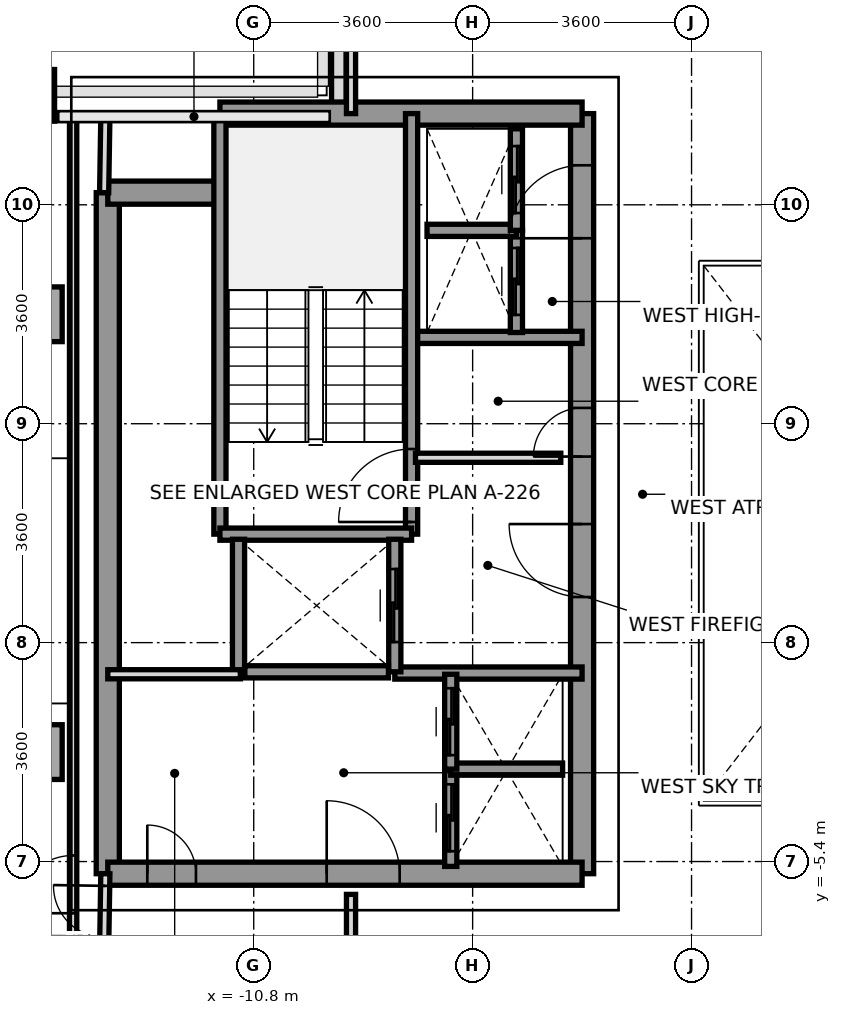
"""IFC4 building model, lengths in metres.
Left out: names, types, materials, properties, quantities, classifications, styles, units other than length and angle.
Written with IfcOpenShell. Run it as: python <this file> out.ifc"""

import sys

from ifc_helpers import new_model, si_unit, direction, frame, frame_2d, origin, origin_2d, place, context, subcontext, project, spatial, rectangle, extrude, source, transform, mapped, element, fill, save


model = new_model("IFC4")
c1 = context("Model", 3, precision=1e-05, world=origin(), true_north=direction((0.0, 1.0)))
c2 = subcontext(c1, "Body", "Model", "MODEL_VIEW")
j1 = project(units=[si_unit("LENGTHUNIT", "METRE"), si_unit("PLANEANGLEUNIT", "RADIAN")], contexts=[c1])
p1 = place(None, origin())
s1 = spatial("IfcSite", under=j1, at=p1, CompositionType="ELEMENT")
p2 = place(p1, origin())
s2 = spatial("IfcBuilding", under=s1, at=p2, CompositionType="ELEMENT")
p3 = place(p2, frame((0.0, 0.0, 177.4)))
s3 = spatial("IfcBuildingStorey", under=s2, at=p3, CompositionType="ELEMENT", Elevation=177.4)
m1 = source(origin(), c2, "Body", "SweptSolid", [
    extrude(rectangle(XDim=0.9, YDim=0.9, at=origin_2d()), origin(), (0.0, 0.0, 1.0), 3.2),
])
for number, where, z_axis, x_axis in (
    (1, (-14.4, -3.6, 0.0), (0.0, 0.0, 1.0), (1.0, 0.0, 0.0)),
    (2, (-14.4, 3.6, 0.0), (0.0, 0.0, 1.0), (1.0, 0.0, 0.0)),
):
    element("IfcColumn", number, at=place(p3, frame(where, z_axis=z_axis, x_axis=x_axis)), inside=s3, PredefinedType="COLUMN", context=c2, shape_type="MappedRepresentation", body=[
        mapped(m1, transform((0.0, 0.0, 0.0), x_axis=(1.0, 0.0, 0.0), y_axis=(0.0, 1.0, 0.0), z_axis=(0.0, 0.0, 1.0), scale=1.0)),
    ])
m2 = source(origin(), c2, "Body", "SweptSolid", [
    extrude(rectangle(XDim=0.65, YDim=0.85, at=origin_2d()), origin(), (0.0, 0.0, 1.0), 3.2),
])
p4 = place(p3, frame((-14.4, 7.2, 0.0), z_axis=(0.0, 0.0, 1.0), x_axis=(1.0, 0.0, 0.0)))
e3 = element("IfcColumn", 3, at=p4, inside=s3, PredefinedType="COLUMN", context=c2, shape_type="MappedRepresentation", body=[
    mapped(m2, transform((0.0, 0.0, 0.0), x_axis=(1.0, 0.0, 0.0), y_axis=(0.0, 1.0, 0.0), z_axis=(0.0, 0.0, 1.0), scale=1.0)),
])
p5 = place(p3, frame((-9.4, 6.953, 0.0), z_axis=(0.0, 0.0, 1.0), x_axis=(0.0, 1.0, 0.0)))
e4 = element("IfcWall", 4, at=p5, inside=s3, PredefinedType="PARAPET", context=c2, shape_type="SweptSolid", body=[
    extrude(rectangle(XDim=1.594, YDim=0.24, at=frame_2d((0.797, 0.0))), origin(), (0.0, 0.0, 1.0), 1.15),
])
p6 = place(p3, frame((-13.2, -5.6, 0.0), z_axis=(0.0, 0.0, 1.0), x_axis=(0.0, 1.0, 0.0)))
e5 = element("IfcWall", 5, at=p6, inside=s3, PredefinedType="SHEAR", context=c2, shape_type="SweptSolid", body=[
    extrude(rectangle(XDim=11.2, YDim=0.38, at=frame_2d((5.6, 0.0))), origin(), (0.0, 0.0, 1.0), 3.2),
])
p7 = place(p3, frame((-5.4, -5.6, 0.0), z_axis=(0.0, 0.0, 1.0), x_axis=(0.0, 1.0, 0.0)))
e6 = element("IfcWall", 6, at=p7, inside=s3, PredefinedType="SHEAR", context=c2, shape_type="SweptSolid", body=[
    extrude(rectangle(XDim=12.5, YDim=0.38, at=frame_2d((6.25, 0.0))), origin(), (0.0, 0.0, 1.0), 3.2),
])
p8 = place(p7, frame((4.55, 0.0, 0.0)))
e7 = element("IfcOpeningElement", 7, at=p8, cuts=e6, PredefinedType="OPENING", context=c2, shape_type="SweptSolid", body=[
    extrude(rectangle(XDim=1.2, YDim=2.2, at=frame_2d((0.6, 1.1))), frame((0.0, 0.2, 0.0), z_axis=(0.0, -1.0, 0.0), x_axis=(1.0, 0.0, 0.0)), (0.0, 0.0, 1.0), 0.4),
])
p9 = place(p7, frame((10.45, 0.0, 0.0)))
e8 = element("IfcOpeningElement", 8, at=p9, cuts=e6, PredefinedType="OPENING", context=c2, shape_type="SweptSolid", body=[
    extrude(rectangle(XDim=1.2, YDim=2.2, at=frame_2d((0.6, 1.1))), frame((0.0, 0.2, 0.0), z_axis=(0.0, -1.0, 0.0), x_axis=(1.0, 0.0, 0.0)), (0.0, 0.0, 1.0), 0.4),
])
p10 = place(p7, frame((6.86, 0.0, 0.0)))
e9 = element("IfcOpeningElement", 9, at=p10, cuts=e6, PredefinedType="OPENING", context=c2, shape_type="SweptSolid", body=[
    extrude(rectangle(XDim=0.8, YDim=2.1, at=frame_2d((0.4, 1.05))), frame((0.0, 0.2, 0.0), z_axis=(0.0, -1.0, 0.0), x_axis=(1.0, 0.0, 0.0)), (0.0, 0.0, 1.0), 0.4),
])
p11 = place(p3, frame((-11.356, 6.9, 0.0), z_axis=(0.0, 0.0, 1.0), x_axis=(1.0, 0.0, 0.0)))
e10 = element("IfcWall", 10, at=p11, inside=s3, PredefinedType="SHEAR", context=c2, shape_type="SweptSolid", body=[
    extrude(rectangle(XDim=5.956, YDim=0.38, at=frame_2d((2.978, 0.0))), origin(), (0.0, 0.0, 1.0), 3.2),
])
p12 = place(p3, frame((-13.2, 5.6, 0.0), z_axis=(0.0, 0.0, 1.0), x_axis=(1.0, 0.0, 0.0)))
e11 = element("IfcWall", 11, at=p12, inside=s3, PredefinedType="SHEAR", context=c2, shape_type="SweptSolid", body=[
    extrude(rectangle(XDim=1.844, YDim=0.38, at=frame_2d((0.922, 0.0))), origin(), (0.0, 0.0, 1.0), 3.2),
])
p13 = place(p3, frame((-13.2, -5.6, 0.0), z_axis=(0.0, 0.0, 1.0), x_axis=(1.0, 0.0, 0.0)))
e12 = element("IfcWall", 12, at=p13, inside=s3, PredefinedType="SHEAR", context=c2, shape_type="SweptSolid", body=[
    extrude(rectangle(XDim=7.8, YDim=0.38, at=frame_2d((3.9, 0.0))), origin(), (0.0, 0.0, 1.0), 3.2),
])
p14 = place(p13, frame((3.6, 0.0, 0.0)))
e13 = element("IfcOpeningElement", 13, at=p14, cuts=e12, PredefinedType="OPENING", context=c2, shape_type="SweptSolid", body=[
    extrude(rectangle(XDim=1.2, YDim=2.2, at=frame_2d((0.6, 1.1))), frame((0.0, 0.2, 0.0), z_axis=(0.0, -1.0, 0.0), x_axis=(1.0, 0.0, 0.0)), (0.0, 0.0, 1.0), 0.4),
])
p15 = place(p13, frame((0.65, 0.0, 0.0)))
e14 = element("IfcOpeningElement", 14, at=p15, cuts=e12, PredefinedType="OPENING", context=c2, shape_type="SweptSolid", body=[
    extrude(rectangle(XDim=0.8, YDim=2.1, at=frame_2d((0.4, 1.05))), frame((0.0, 0.2, 0.0), z_axis=(0.0, -1.0, 0.0), x_axis=(1.0, 0.0, 0.0)), (0.0, 0.0, 1.0), 0.4),
])
p16 = place(p3, frame((-8.18, 3.22, 0.0), z_axis=(0.0, 0.0, 1.0), x_axis=(1.0, 0.0, 0.0)))
e15 = element("IfcWall", 15, at=p16, inside=s3, PredefinedType="SOLIDWALL", context=c2, shape_type="SweptSolid", body=[
    extrude(rectangle(XDim=2.78, YDim=0.2, at=frame_2d((1.39, 0.0))), origin(), (0.0, 0.0, 1.0), 3.2),
])
p17 = place(p3, frame((-8.48, -2.3, 0.0), z_axis=(0.0, 0.0, 1.0), x_axis=(1.0, 0.0, 0.0)))
e16 = element("IfcWall", 16, at=p17, inside=s3, PredefinedType="SOLIDWALL", context=c2, shape_type="SweptSolid", body=[
    extrude(rectangle(XDim=3.08, YDim=0.2, at=frame_2d((1.54, 0.0))), origin(), (0.0, 0.0, 1.0), 3.2),
])
p18 = place(p3, frame((-8.204, -0.016, 0.0), z_axis=(0.0, 0.0, 1.0), x_axis=(0.0, 1.0, 0.0)))
e17 = element("IfcWall", 17, at=p18, inside=s3, PredefinedType="SOLIDWALL", context=c2, shape_type="SweptSolid", body=[
    extrude(rectangle(XDim=6.916, YDim=0.2, at=frame_2d((3.458, 0.0))), origin(), (0.0, 0.0, 1.0), 3.2),
])
p19 = place(p18, frame((0.2, 0.0, 0.0)))
e18 = element("IfcOpeningElement", 18, at=p19, cuts=e17, PredefinedType="OPENING", context=c2, shape_type="SweptSolid", body=[
    extrude(rectangle(XDim=1.2, YDim=2.2, at=frame_2d((0.6, 1.1))), frame((0.0, 0.11, 0.0), z_axis=(0.0, -1.0, 0.0), x_axis=(1.0, 0.0, 0.0)), (0.0, 0.0, 1.0), 0.22),
])
p20 = place(p3, frame((-11.356, -0.016, 0.0), z_axis=(0.0, 0.0, 1.0), x_axis=(0.0, 1.0, 0.0)))
e19 = element("IfcWall", 19, at=p20, inside=s3, PredefinedType="SOLIDWALL", context=c2, shape_type="SweptSolid", body=[
    extrude(rectangle(XDim=6.916, YDim=0.2, at=frame_2d((3.458, 0.0))), origin(), (0.0, 0.0, 1.0), 3.2),
])
p21 = place(p3, frame((-11.356, -0.016, 0.0), z_axis=(0.0, 0.0, 1.0), x_axis=(1.0, 0.0, 0.0)))
e20 = element("IfcWall", 20, at=p21, inside=s3, PredefinedType="SOLIDWALL", context=c2, shape_type="SweptSolid", body=[
    extrude(rectangle(XDim=3.152, YDim=0.2, at=frame_2d((1.576, 0.0))), origin(), (0.0, 0.0, 1.0), 3.2),
])
p22 = place(p3, frame((-11.05, -2.28, 0.0), z_axis=(0.0, 0.0, 1.0), x_axis=(0.0, 1.0, 0.0)))
e21 = element("IfcWall", 21, at=p22, inside=s3, PredefinedType="SOLIDWALL", context=c2, shape_type="SweptSolid", body=[
    extrude(rectangle(XDim=2.18, YDim=0.2, at=frame_2d((1.09, 0.0))), origin(), (0.0, 0.0, 1.0), 3.2),
])
p23 = place(p3, frame((-8.48, -2.28, 0.0), z_axis=(0.0, 0.0, 1.0), x_axis=(0.0, 1.0, 0.0)))
e22 = element("IfcWall", 22, at=p23, inside=s3, PredefinedType="SOLIDWALL", context=c2, shape_type="SweptSolid", body=[
    extrude(rectangle(XDim=2.18, YDim=0.2, at=frame_2d((1.09, 0.0))), origin(), (0.0, 0.0, 1.0), 3.2),
])
p24 = place(p23, frame((0.49, 0.0, 0.0)))
e23 = element("IfcOpeningElement", 23, at=p24, cuts=e22, PredefinedType="OPENING", context=c2, shape_type="SweptSolid", body=[
    extrude(rectangle(XDim=1.2, YDim=2.2, at=frame_2d((0.6, 1.1))), frame((0.0, 0.11, 0.0), z_axis=(0.0, -1.0, 0.0), x_axis=(1.0, 0.0, 0.0)), (0.0, 0.0, 1.0), 0.22),
])
p25 = place(p3, frame((-10.946, -2.28, 0.0), z_axis=(0.0, 0.0, 1.0), x_axis=(1.0, 0.0, 0.0)))
e24 = element("IfcWall", 24, at=p25, inside=s3, PredefinedType="SOLIDWALL", context=c2, shape_type="SweptSolid", body=[
    extrude(rectangle(XDim=2.362, YDim=0.2, at=frame_2d((1.181, 0.0))), origin(), (0.0, 0.0, 1.0), 3.2),
])
p26 = place(p3, frame((-7.56, -5.48, 0.0), z_axis=(0.0, 0.0, 1.0), x_axis=(0.0, 1.0, 0.0)))
e25 = element("IfcWall", 25, at=p26, inside=s3, PredefinedType="SOLIDWALL", context=c2, shape_type="SweptSolid", body=[
    extrude(rectangle(XDim=1.6, YDim=0.2, at=frame_2d((0.8, 0.0))), origin(), (0.0, 0.0, 1.0), 3.2),
])
p27 = place(p26, frame((0.25, 0.0, 0.0)))
e26 = element("IfcOpeningElement", 26, at=p27, cuts=e25, PredefinedType="OPENING", context=c2, shape_type="SweptSolid", body=[
    extrude(rectangle(XDim=1.1, YDim=2.2, at=frame_2d((0.55, 1.1))), frame((0.0, 0.11, 0.0), z_axis=(0.0, -1.0, 0.0), x_axis=(1.0, 0.0, 0.0)), (0.0, 0.0, 1.0), 0.22),
])
p28 = place(p3, frame((-7.56, -3.88, 0.0), z_axis=(0.0, 0.0, 1.0), x_axis=(1.0, 0.0, 0.0)))
e27 = element("IfcWall", 27, at=p28, inside=s3, PredefinedType="SOLIDWALL", context=c2, shape_type="SweptSolid", body=[
    extrude(rectangle(XDim=1.84, YDim=0.2, at=frame_2d((0.92, 0.0))), origin(), (0.0, 0.0, 1.0), 3.2),
])
p29 = place(p3, frame((-7.56, -3.88, 0.0), z_axis=(0.0, 0.0, 1.0), x_axis=(0.0, 1.0, 0.0)))
e28 = element("IfcWall", 28, at=p29, inside=s3, PredefinedType="SOLIDWALL", context=c2, shape_type="SweptSolid", body=[
    extrude(rectangle(XDim=1.56, YDim=0.2, at=frame_2d((0.78, 0.0))), origin(), (0.0, 0.0, 1.0), 3.2),
])
p30 = place(p29, frame((0.23, 0.0, 0.0)))
e29 = element("IfcOpeningElement", 29, at=p30, cuts=e28, PredefinedType="OPENING", context=c2, shape_type="SweptSolid", body=[
    extrude(rectangle(XDim=1.1, YDim=2.2, at=frame_2d((0.55, 1.1))), frame((0.0, 0.11, 0.0), z_axis=(0.0, -1.0, 0.0), x_axis=(1.0, 0.0, 0.0)), (0.0, 0.0, 1.0), 0.22),
])
p31 = place(p3, frame((-6.48, 3.3, 0.0), z_axis=(0.0, 0.0, 1.0), x_axis=(0.0, 1.0, 0.0)))
e30 = element("IfcWall", 30, at=p31, inside=s3, PredefinedType="SOLIDWALL", context=c2, shape_type="SweptSolid", body=[
    extrude(rectangle(XDim=1.68, YDim=0.2, at=frame_2d((0.84, 0.0))), origin(), (0.0, 0.0, 1.0), 3.2),
])
p32 = place(p31, frame((0.29, 0.0, 0.0)))
e31 = element("IfcOpeningElement", 31, at=p32, cuts=e30, PredefinedType="OPENING", context=c2, shape_type="SweptSolid", body=[
    extrude(rectangle(XDim=1.1, YDim=2.2, at=frame_2d((0.55, 1.1))), frame((0.0, 0.11, 0.0), z_axis=(0.0, -1.0, 0.0), x_axis=(1.0, 0.0, 0.0)), (0.0, 0.0, 1.0), 0.22),
])
p33 = place(p3, frame((-7.95, 4.98, 0.0), z_axis=(0.0, 0.0, 1.0), x_axis=(1.0, 0.0, 0.0)))
e32 = element("IfcWall", 32, at=p33, inside=s3, PredefinedType="SOLIDWALL", context=c2, shape_type="SweptSolid", body=[
    extrude(rectangle(XDim=1.47, YDim=0.2, at=frame_2d((0.735, 0.0))), origin(), (0.0, 0.0, 1.0), 3.2),
])
p34 = place(p3, frame((-6.48, 4.98, 0.0), z_axis=(0.0, 0.0, 1.0), x_axis=(0.0, 1.0, 0.0)))
e33 = element("IfcWall", 33, at=p34, inside=s3, PredefinedType="SOLIDWALL", context=c2, shape_type="SweptSolid", body=[
    extrude(rectangle(XDim=1.67, YDim=0.2, at=frame_2d((0.835, 0.0))), origin(), (0.0, 0.0, 1.0), 3.2),
])
p35 = place(p34, frame((0.285, 0.0, 0.0)))
e34 = element("IfcOpeningElement", 34, at=p35, cuts=e33, PredefinedType="OPENING", context=c2, shape_type="SweptSolid", body=[
    extrude(rectangle(XDim=1.1, YDim=2.2, at=frame_2d((0.55, 1.1))), frame((0.0, 0.11, 0.0), z_axis=(0.0, -1.0, 0.0), x_axis=(1.0, 0.0, 0.0)), (0.0, 0.0, 1.0), 0.22),
])
p36 = place(p3, frame((-8.14, 1.24, 0.0), z_axis=(0.0, 0.0, 1.0), x_axis=(1.0, 0.0, 0.0)))
e35 = element("IfcWall", 35, at=p36, inside=s3, PredefinedType="PARTITIONING", context=c2, shape_type="SweptSolid", body=[
    extrude(rectangle(XDim=2.39, YDim=0.15, at=frame_2d((1.195, 0.0))), origin(), (0.0, 0.0, 1.0), 2.3),
])
p37 = place(p3, frame((-13.2, -2.32, 0.0), z_axis=(0.0, 0.0, 1.0), x_axis=(1.0, 0.0, 0.0)))
e36 = element("IfcWall", 36, at=p37, inside=s3, PredefinedType="PARTITIONING", context=c2, shape_type="SweptSolid", body=[
    extrude(rectangle(XDim=2.18, YDim=0.15, at=frame_2d((1.09, 0.0))), origin(), (0.0, 0.0, 1.0), 3.2),
])
p38 = place(p3, frame((-9.2, 6.9, 0.0), z_axis=(0.0, 0.0, 1.0), x_axis=(0.0, 1.0, 0.0)))
e37 = element("IfcWall", 37, at=p38, inside=s3, PredefinedType="PARTITIONING", context=c2, shape_type="SweptSolid", body=[
    extrude(rectangle(XDim=8.78, YDim=0.15, at=frame_2d((4.39, 0.0))), origin(), (0.0, 0.0, 1.0), 2.75),
])
p39 = place(p3, frame((-9.2, -15.68, 0.0), z_axis=(0.0, 0.0, 1.0), x_axis=(0.0, 1.0, 0.0)))
e38 = element("IfcWall", 38, at=p39, inside=s3, PredefinedType="PARTITIONING", context=c2, shape_type="SweptSolid", body=[
    extrude(rectangle(XDim=9.74, YDim=0.15, at=frame_2d((4.87, 0.0))), origin(), (0.0, 0.0, 1.0), 2.75),
])
p40 = place(p3, frame((-13.26, 5.6, 0.0), z_axis=(0.0, 0.0, 1.0), x_axis=(0.016013571389, 0.999871774545, 0.0)))
e39 = element("IfcWall", 39, at=p40, inside=s3, PredefinedType="PARTITIONING", context=c2, shape_type="SweptSolid", body=[
    extrude(rectangle(XDim=1.25, YDim=0.15, at=frame_2d((0.625, 0.0))), origin(), (0.0, 0.0, 1.0), 3.2),
])
p41 = place(p3, frame((-13.26, -6.85, 0.0), z_axis=(0.0, 0.0, 1.0), x_axis=(0.016013571389, 0.999871774545, 0.0)))
e40 = element("IfcWall", 40, at=p41, inside=s3, PredefinedType="PARTITIONING", context=c2, shape_type="SweptSolid", body=[
    extrude(rectangle(XDim=1.25, YDim=0.15, at=frame_2d((0.625, 0.0))), origin(), (0.0, 0.0, 1.0), 3.2),
])
p42 = place(p41, frame((0.2, 0.0, 0.0)))
e41 = element("IfcOpeningElement", 41, at=p42, cuts=e40, PredefinedType="OPENING", context=c2, shape_type="SweptSolid", body=[
    extrude(rectangle(XDim=0.85, YDim=2.1, at=frame_2d((0.425, 1.05))), frame((0.0, 0.085, 0.0), z_axis=(0.0, -1.0, 0.0), x_axis=(1.0, 0.0, 0.0)), (0.0, 0.0, 1.0), 0.17),
])
p43 = place(p3, frame((-13.77, -6.85, 0.0), z_axis=(0.0, 0.0, 1.0), x_axis=(0.0, 1.0, 0.0)))
e42 = element("IfcWall", 42, at=p43, inside=s3, PredefinedType="PARTITIONING", context=c2, shape_type="SweptSolid", body=[
    extrude(rectangle(XDim=13.7, YDim=0.12, at=frame_2d((6.85, 0.0))), origin(), (0.0, 0.0, 1.0), 2.87),
])
p44 = place(p43, frame((0.6, 0.0, 0.0)))
e43 = element("IfcOpeningElement", 43, at=p44, cuts=e42, PredefinedType="OPENING", context=c2, shape_type="SweptSolid", body=[
    extrude(rectangle(XDim=0.95, YDim=2.15, at=frame_2d((0.475, 1.075))), frame((0.0, 0.07, 0.0), z_axis=(0.0, -1.0, 0.0), x_axis=(1.0, 0.0, 0.0)), (0.0, 0.0, 1.0), 0.14),
])
m3 = source(origin(), c2, "Body", "SweptSolid", [
    extrude(rectangle(XDim=1.2, YDim=2.2, at=frame_2d((0.6, 1.1))), frame((0.0, 0.025, 0.0), z_axis=(0.0, -1.0, 0.0), x_axis=(1.0, 0.0, 0.0)), (0.0, 0.0, 1.0), 0.05),
])
p45 = place(p19, origin())
e44 = element("IfcDoor", 44, at=p45, inside=s3, OperationType="SINGLE_SWING_LEFT", PredefinedType="DOOR", context=c2, shape_type="MappedRepresentation", body=[
    mapped(m3, transform((0.0, 0.0, 0.0), x_axis=(1.0, 0.0, 0.0), y_axis=(0.0, 1.0, 0.0), z_axis=(0.0, 0.0, 1.0), scale=1.0)),
])
fill(e18, e44)
p46 = place(p8, origin())
e45 = element("IfcDoor", 45, at=p46, inside=s3, OperationType="SINGLE_SWING_RIGHT", PredefinedType="DOOR", context=c2, shape_type="MappedRepresentation", body=[
    mapped(m3, transform((0.0, 0.0, 0.0), x_axis=(1.0, 0.0, 0.0), y_axis=(0.0, 1.0, 0.0), z_axis=(0.0, 0.0, 1.0), scale=1.0)),
])
fill(e7, e45)
p47 = place(p9, origin())
e46 = element("IfcDoor", 46, at=p47, inside=s3, OperationType="SINGLE_SWING_LEFT", PredefinedType="DOOR", context=c2, shape_type="MappedRepresentation", body=[
    mapped(m3, transform((0.0, 0.0, 0.0), x_axis=(1.0, 0.0, 0.0), y_axis=(0.0, 1.0, 0.0), z_axis=(0.0, 0.0, 1.0), scale=1.0)),
])
fill(e8, e46)
p48 = place(p14, origin())
e47 = element("IfcDoor", 47, at=p48, inside=s3, OperationType="SINGLE_SWING_LEFT", PredefinedType="DOOR", context=c2, shape_type="MappedRepresentation", body=[
    mapped(m3, transform((0.0, 0.0, 0.0), x_axis=(1.0, 0.0, 0.0), y_axis=(0.0, 1.0, 0.0), z_axis=(0.0, 0.0, 1.0), scale=1.0)),
])
fill(e13, e47)
m4 = source(origin(), c2, "Body", "SweptSolid", [
    extrude(rectangle(XDim=0.8, YDim=2.1, at=frame_2d((0.4, 1.05))), frame((0.0, 0.025, 0.0), z_axis=(0.0, -1.0, 0.0), x_axis=(1.0, 0.0, 0.0)), (0.0, 0.0, 1.0), 0.05),
])
p49 = place(p10, origin())
e48 = element("IfcDoor", 48, at=p49, inside=s3, OperationType="SINGLE_SWING_LEFT", PredefinedType="DOOR", context=c2, shape_type="MappedRepresentation", body=[
    mapped(m4, transform((0.0, 0.0, 0.0), x_axis=(1.0, 0.0, 0.0), y_axis=(0.0, 1.0, 0.0), z_axis=(0.0, 0.0, 1.0), scale=1.0)),
])
fill(e9, e48)
p50 = place(p15, origin())
e49 = element("IfcDoor", 49, at=p50, inside=s3, OperationType="SINGLE_SWING_LEFT", PredefinedType="DOOR", context=c2, shape_type="MappedRepresentation", body=[
    mapped(m4, transform((0.0, 0.0, 0.0), x_axis=(1.0, 0.0, 0.0), y_axis=(0.0, 1.0, 0.0), z_axis=(0.0, 0.0, 1.0), scale=1.0)),
])
fill(e14, e49)
p51 = place(p24, origin())
e50 = element("IfcDoor", 50, at=p51, inside=s3, OperationType="SLIDING_TO_RIGHT", PredefinedType="DOOR", context=c2, shape_type="MappedRepresentation", body=[
    mapped(m3, transform((0.0, 0.0, 0.0), x_axis=(1.0, 0.0, 0.0), y_axis=(0.0, 1.0, 0.0), z_axis=(0.0, 0.0, 1.0), scale=1.0)),
])
fill(e23, e50)
m5 = source(origin(), c2, "Body", "SweptSolid", [
    extrude(rectangle(XDim=1.1, YDim=2.2, at=frame_2d((0.55, 1.1))), frame((0.0, 0.025, 0.0), z_axis=(0.0, -1.0, 0.0), x_axis=(1.0, 0.0, 0.0)), (0.0, 0.0, 1.0), 0.05),
])
p52 = place(p27, origin())
e51 = element("IfcDoor", 51, at=p52, inside=s3, OperationType="SLIDING_TO_LEFT", PredefinedType="DOOR", context=c2, shape_type="MappedRepresentation", body=[
    mapped(m5, transform((0.0, 0.0, 0.0), x_axis=(1.0, 0.0, 0.0), y_axis=(0.0, 1.0, 0.0), z_axis=(0.0, 0.0, 1.0), scale=1.0)),
])
fill(e26, e51)
p53 = place(p30, origin())
e52 = element("IfcDoor", 52, at=p53, inside=s3, OperationType="SLIDING_TO_LEFT", PredefinedType="DOOR", context=c2, shape_type="MappedRepresentation", body=[
    mapped(m5, transform((0.0, 0.0, 0.0), x_axis=(1.0, 0.0, 0.0), y_axis=(0.0, 1.0, 0.0), z_axis=(0.0, 0.0, 1.0), scale=1.0)),
])
fill(e29, e52)
p54 = place(p32, origin())
e53 = element("IfcDoor", 53, at=p54, inside=s3, OperationType="SLIDING_TO_LEFT", PredefinedType="DOOR", context=c2, shape_type="MappedRepresentation", body=[
    mapped(m5, transform((0.0, 0.0, 0.0), x_axis=(1.0, 0.0, 0.0), y_axis=(0.0, 1.0, 0.0), z_axis=(0.0, 0.0, 1.0), scale=1.0)),
])
fill(e31, e53)
p55 = place(p35, origin())
e54 = element("IfcDoor", 54, at=p55, inside=s3, OperationType="SLIDING_TO_LEFT", PredefinedType="DOOR", context=c2, shape_type="MappedRepresentation", body=[
    mapped(m5, transform((0.0, 0.0, 0.0), x_axis=(1.0, 0.0, 0.0), y_axis=(0.0, 1.0, 0.0), z_axis=(0.0, 0.0, 1.0), scale=1.0)),
])
fill(e34, e54)
m6 = source(origin(), c2, "Body", "SweptSolid", [
    extrude(rectangle(XDim=0.95, YDim=2.15, at=frame_2d((0.475, 1.075))), frame((0.0, 0.025, 0.0), z_axis=(0.0, -1.0, 0.0), x_axis=(1.0, 0.0, 0.0)), (0.0, 0.0, 1.0), 0.05),
])
p56 = place(p44, origin())
e55 = element("IfcDoor", 55, at=p56, inside=s3, OperationType="SINGLE_SWING_LEFT", PredefinedType="DOOR", context=c2, shape_type="MappedRepresentation", body=[
    mapped(m6, transform((0.0, 0.0, 0.0), x_axis=(1.0, 0.0, 0.0), y_axis=(0.0, 1.0, 0.0), z_axis=(0.0, 0.0, 1.0), scale=1.0)),
])
fill(e43, e55)
m7 = source(origin(), c2, "Body", "SweptSolid", [
    extrude(rectangle(XDim=0.85, YDim=2.1, at=frame_2d((0.425, 1.05))), frame((0.0, 0.025, 0.0), z_axis=(0.0, -1.0, 0.0), x_axis=(1.0, 0.0, 0.0)), (0.0, 0.0, 1.0), 0.05),
])
p57 = place(p42, origin())
e56 = element("IfcDoor", 56, at=p57, inside=s3, OperationType="SINGLE_SWING_RIGHT", PredefinedType="DOOR", context=c2, shape_type="MappedRepresentation", body=[
    mapped(m7, transform((0.0, 0.0, 0.0), x_axis=(1.0, 0.0, 0.0), y_axis=(0.0, 1.0, 0.0), z_axis=(0.0, 0.0, 1.0), scale=1.0)),
])
fill(e41, e56)
save(model, sys.argv[1])
